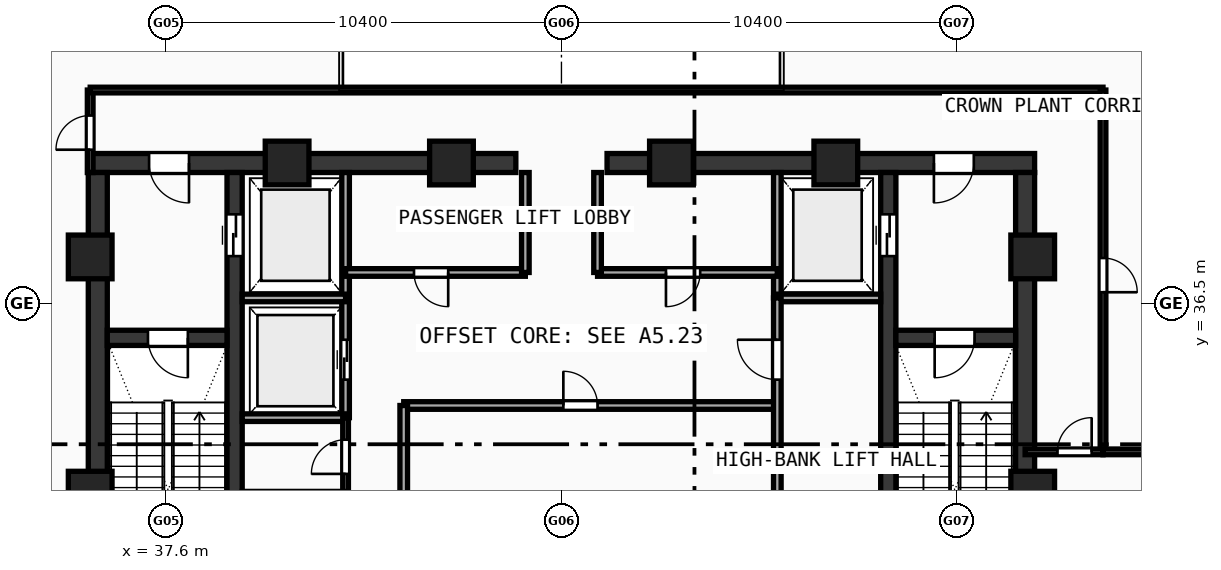
"""IFC4 building model, lengths in metres.
Left out: names, types, materials, properties, quantities, classifications, styles, units other than length and angle.
Written with IfcOpenShell. Run it as: python <this file> out.ifc"""

import sys

from ifc_helpers import new_model, si_unit, direction, frame, frame_2d, origin, origin_with_axes, origin_2d, place, context, subcontext, project, spatial, rectangle, hollow_rectangle, extrude, source, transform, mapped, element, fill, save


model = new_model("IFC4")
c1 = context("Model", 3, precision=1e-05, world=origin(), true_north=direction((0.0, 1.0)))
c2 = subcontext(c1, "Body", "Model", "MODEL_VIEW")
j1 = project(units=[si_unit("LENGTHUNIT", "METRE"), si_unit("PLANEANGLEUNIT", "RADIAN")], contexts=[c1])
p1 = place(None, origin())
s1 = spatial("IfcSite", under=j1, at=p1, CompositionType="ELEMENT")
p2 = place(p1, origin())
s2 = spatial("IfcBuilding", under=s1, at=p2, CompositionType="ELEMENT")
p3 = place(p2, frame((0.0, 0.0, 371.76)))
s3 = spatial("IfcBuildingStorey", under=s2, at=p3, CompositionType="ELEMENT", Elevation=371.76)
p4 = place(p3, frame((35.55, 40.2, 0.0), z_axis=(0.0, 0.0, 1.0), x_axis=(1.0, 0.0, 0.0)))
e1 = element("IfcWall", 1, at=p4, inside=s3, PredefinedType="SHEAR", context=c2, shape_type="SweptSolid", body=[
    extrude(rectangle(XDim=11.25, YDim=0.5, at=frame_2d((5.625, 0.0))), origin(), (0.0, 0.0, 1.0), 4.72),
])
p5 = place(p4, frame((1.6, 0.0, 0.0)))
e2 = element("IfcOpeningElement", 2, at=p5, cuts=e1, PredefinedType="OPENING", context=c2, shape_type="SweptSolid", body=[
    extrude(rectangle(XDim=1.05, YDim=2.1, at=frame_2d((0.525, 1.05))), frame((0.0, 0.26, 0.0), z_axis=(0.0, -1.0, 0.0), x_axis=(1.0, 0.0, 0.0)), (0.0, 0.0, 1.0), 0.52),
])
p6 = place(p3, frame((49.2, 40.2, 0.0), z_axis=(0.0, 0.0, 1.0), x_axis=(1.0, 0.0, 0.0)))
e3 = element("IfcWall", 3, at=p6, inside=s3, PredefinedType="SHEAR", context=c2, shape_type="SweptSolid", body=[
    extrude(rectangle(XDim=11.25, YDim=0.5, at=frame_2d((5.625, 0.0))), origin(), (0.0, 0.0, 1.0), 4.72),
])
p7 = place(p6, frame((8.6, 0.0, 0.0)))
e4 = element("IfcOpeningElement", 4, at=p7, cuts=e3, PredefinedType="OPENING", context=c2, shape_type="SweptSolid", body=[
    extrude(rectangle(XDim=1.05, YDim=2.1, at=frame_2d((0.525, 1.05))), frame((0.0, 0.26, 0.0), z_axis=(0.0, -1.0, 0.0), x_axis=(1.0, 0.0, 0.0)), (0.0, 0.0, 1.0), 0.52),
])
for number, where, z_axis, x_axis in (
    (5, (35.8, 27.75, 0.0), (0.0, 0.0, 1.0), (0.0, 1.0, 0.0)),
    (6, (60.2, 27.75, 0.0), (0.0, 0.0, 1.0), (0.0, 1.0, 0.0)),
):
    element("IfcWall", number, at=place(p3, frame(where, z_axis=z_axis, x_axis=x_axis)), inside=s3, PredefinedType="SHEAR", context=c2, shape_type="SweptSolid", body=[
        extrude(rectangle(XDim=12.2, YDim=0.5, at=frame_2d((6.1, 0.0))), origin(), (0.0, 0.0, 1.0), 4.72),
    ])
p8 = place(p3, frame((39.4, 27.75, 0.0), z_axis=(0.0, 0.0, 1.0), x_axis=(0.0, 1.0, 0.0)))
e7 = element("IfcWall", 7, at=p8, inside=s3, PredefinedType="SHEAR", context=c2, shape_type="SweptSolid", body=[
    extrude(rectangle(XDim=12.2, YDim=0.4, at=frame_2d((6.1, 0.0))), origin(), (0.0, 0.0, 1.0), 4.72),
])
p9 = place(p8, frame((10.0, 0.0, 0.0)))
e8 = element("IfcOpeningElement", 8, at=p9, cuts=e7, PredefinedType="OPENING", context=c2, shape_type="SweptSolid", body=[
    extrude(rectangle(XDim=1.1, YDim=2.1, at=frame_2d((0.55, 1.05))), frame((0.0, 0.21, 0.0), z_axis=(0.0, -1.0, 0.0), x_axis=(1.0, 0.0, 0.0)), (0.0, 0.0, 1.0), 0.42),
])
p10 = place(p3, frame((56.6, 27.75, 0.0), z_axis=(0.0, 0.0, 1.0), x_axis=(0.0, 1.0, 0.0)))
e9 = element("IfcWall", 9, at=p10, inside=s3, PredefinedType="SHEAR", context=c2, shape_type="SweptSolid", body=[
    extrude(rectangle(XDim=12.2, YDim=0.4, at=frame_2d((6.1, 0.0))), origin(), (0.0, 0.0, 1.0), 4.72),
])
p11 = place(p10, frame((10.0, 0.0, 0.0)))
e10 = element("IfcOpeningElement", 10, at=p11, cuts=e9, PredefinedType="OPENING", context=c2, shape_type="SweptSolid", body=[
    extrude(rectangle(XDim=1.1, YDim=2.1, at=frame_2d((0.55, 1.05))), frame((0.0, 0.21, 0.0), z_axis=(0.0, -1.0, 0.0), x_axis=(1.0, 0.0, 0.0)), (0.0, 0.0, 1.0), 0.42),
])
p12 = place(p3, frame((36.05, 35.6, 0.0), z_axis=(0.0, 0.0, 1.0), x_axis=(1.0, 0.0, 0.0)))
e11 = element("IfcWall", 11, at=p12, inside=s3, PredefinedType="SHEAR", context=c2, shape_type="SweptSolid", body=[
    extrude(rectangle(XDim=3.15, YDim=0.4, at=frame_2d((1.575, 0.0))), origin(), (0.0, 0.0, 1.0), 4.72),
])
p13 = place(p12, frame((1.07, 0.0, 0.0)))
e12 = element("IfcOpeningElement", 12, at=p13, cuts=e11, PredefinedType="OPENING", context=c2, shape_type="SweptSolid", body=[
    extrude(rectangle(XDim=1.05, YDim=2.1, at=frame_2d((0.525, 1.05))), frame((0.0, 0.21, 0.0), z_axis=(0.0, -1.0, 0.0), x_axis=(1.0, 0.0, 0.0)), (0.0, 0.0, 1.0), 0.42),
])
p14 = place(p3, frame((56.8, 35.6, 0.0), z_axis=(0.0, 0.0, 1.0), x_axis=(1.0, 0.0, 0.0)))
e13 = element("IfcWall", 13, at=p14, inside=s3, PredefinedType="SHEAR", context=c2, shape_type="SweptSolid", body=[
    extrude(rectangle(XDim=3.15, YDim=0.4, at=frame_2d((1.575, 0.0))), origin(), (0.0, 0.0, 1.0), 4.72),
])
p15 = place(p14, frame((1.02, 0.0, 0.0)))
e14 = element("IfcOpeningElement", 14, at=p15, cuts=e13, PredefinedType="OPENING", context=c2, shape_type="SweptSolid", body=[
    extrude(rectangle(XDim=1.05, YDim=2.1, at=frame_2d((0.525, 1.05))), frame((0.0, 0.21, 0.0), z_axis=(0.0, -1.0, 0.0), x_axis=(1.0, 0.0, 0.0)), (0.0, 0.0, 1.0), 0.42),
])
m1 = source(origin(), c2, "Body", "SweptSolid", [
    extrude(hollow_rectangle(XDim=1.15, YDim=1.15, WallThickness=0.048, at=origin_2d()), origin(), (0.0, 0.0, 1.0), 5.0),
])
for number, where, z_axis, x_axis in (
    (15, (60.4, 31.513, -0.28), (0.0, 0.0, 1.0), (1.0, 0.0, 0.0)),
    (16, (60.4, 37.729, -0.28), (0.0, 0.0, 1.0), (1.0, 0.0, 0.0)),
    (17, (55.219, 40.2, -0.28), (0.0, 0.0, 1.0), (1.0, 0.0, 0.0)),
    (18, (50.894, 40.2, -0.28), (0.0, 0.0, 1.0), (1.0, 0.0, 0.0)),
    (19, (45.106, 40.2, -0.28), (0.0, 0.0, 1.0), (1.0, 0.0, 0.0)),
    (20, (40.781, 40.2, -0.28), (0.0, 0.0, 1.0), (1.0, 0.0, 0.0)),
    (21, (35.6, 37.729, -0.28), (0.0, 0.0, 1.0), (1.0, 0.0, 0.0)),
    (22, (35.6, 31.513, -0.28), (0.0, 0.0, 1.0), (1.0, 0.0, 0.0)),
):
    element("IfcColumn", number, at=place(p3, frame(where, z_axis=z_axis, x_axis=x_axis)), inside=s3, PredefinedType="COLUMN", context=c2, shape_type="MappedRepresentation", body=[
        mapped(m1, transform((0.0, 0.0, 0.0), scale=1.0)),
    ])
p16 = place(p3, frame((42.32, 33.5, 0.0), z_axis=(0.0, 0.0, 1.0), x_axis=(0.0, 1.0, 0.0)))
e23 = element("IfcWall", 23, at=p16, inside=s3, PredefinedType="SOLIDWALL", context=c2, shape_type="SweptSolid", body=[
    extrude(rectangle(XDim=6.45, YDim=0.2, at=frame_2d((3.225, 0.0))), origin(), (0.0, 0.0, 1.0), 4.72),
])
p17 = place(p16, frame((1.0, 0.0, 0.0)))
e24 = element("IfcOpeningElement", 24, at=p17, cuts=e23, PredefinedType="OPENING", context=c2, shape_type="SweptSolid", body=[
    extrude(rectangle(XDim=1.05, YDim=2.1, at=frame_2d((0.525, 1.05))), frame((0.0, 0.11, 0.0), z_axis=(0.0, -1.0, 0.0), x_axis=(1.0, 0.0, 0.0)), (0.0, 0.0, 1.0), 0.22),
])
for number, where, z_axis, x_axis in (
    (25, (39.6, 36.65, 0.0), (0.0, 0.0, 1.0), (1.0, 0.0, 0.0)),
    (26, (39.6, 33.5, 0.0), (0.0, 0.0, 1.0), (1.0, 0.0, 0.0)),
):
    element("IfcWall", number, at=place(p3, frame(where, z_axis=z_axis, x_axis=x_axis)), inside=s3, PredefinedType="SOLIDWALL", context=c2, shape_type="SweptSolid", body=[
        extrude(rectangle(XDim=2.72, YDim=0.2, at=frame_2d((1.36, 0.0))), origin(), (0.0, 0.0, 1.0), 4.72),
    ])
p18 = place(p3, frame((53.68, 36.65, 0.0), z_axis=(0.0, 0.0, 1.0), x_axis=(0.0, 1.0, 0.0)))
e27 = element("IfcWall", 27, at=p18, inside=s3, PredefinedType="SOLIDWALL", context=c2, shape_type="SweptSolid", body=[
    extrude(rectangle(XDim=3.3, YDim=0.2, at=frame_2d((1.65, 0.0))), origin(), (0.0, 0.0, 1.0), 4.72),
])
p19 = place(p3, frame((53.68, 36.65, 0.0), z_axis=(0.0, 0.0, 1.0), x_axis=(1.0, 0.0, 0.0)))
e28 = element("IfcWall", 28, at=p19, inside=s3, PredefinedType="SOLIDWALL", context=c2, shape_type="SweptSolid", body=[
    extrude(rectangle(XDim=2.72, YDim=0.2, at=frame_2d((1.36, 0.0))), origin(), (0.0, 0.0, 1.0), 4.72),
])
p20 = place(p3, frame((42.32, 37.32, 0.0), z_axis=(0.0, 0.0, 1.0), x_axis=(1.0, 0.0, 0.0)))
e29 = element("IfcWall", 29, at=p20, inside=s3, PredefinedType="SOLIDWALL", context=c2, shape_type="SweptSolid", body=[
    extrude(rectangle(XDim=4.73, YDim=0.2, at=frame_2d((2.365, 0.0))), origin(), (0.0, 0.0, 1.0), 4.72),
])
p21 = place(p20, frame((1.8, 0.0, 0.0)))
e30 = element("IfcOpeningElement", 30, at=p21, cuts=e29, PredefinedType="OPENING", context=c2, shape_type="SweptSolid", body=[
    extrude(rectangle(XDim=0.9, YDim=2.1, at=frame_2d((0.45, 1.05))), frame((0.0, 0.11, 0.0), z_axis=(0.0, -1.0, 0.0), x_axis=(1.0, 0.0, 0.0)), (0.0, 0.0, 1.0), 0.22),
])
p22 = place(p3, frame((48.95, 37.32, 0.0), z_axis=(0.0, 0.0, 1.0), x_axis=(1.0, 0.0, 0.0)))
e31 = element("IfcWall", 31, at=p22, inside=s3, PredefinedType="SOLIDWALL", context=c2, shape_type="SweptSolid", body=[
    extrude(rectangle(XDim=4.73, YDim=0.2, at=frame_2d((2.365, 0.0))), origin(), (0.0, 0.0, 1.0), 4.72),
])
p23 = place(p22, frame((1.8, 0.0, 0.0)))
e32 = element("IfcOpeningElement", 32, at=p23, cuts=e31, PredefinedType="OPENING", context=c2, shape_type="SweptSolid", body=[
    extrude(rectangle(XDim=0.9, YDim=2.1, at=frame_2d((0.45, 1.05))), frame((0.0, 0.11, 0.0), z_axis=(0.0, -1.0, 0.0), x_axis=(1.0, 0.0, 0.0)), (0.0, 0.0, 1.0), 0.22),
])
for number, where, z_axis, x_axis in (
    (33, (47.05, 37.32, 0.0), (0.0, 0.0, 1.0), (0.0, 1.0, 0.0)),
    (34, (48.95, 37.32, 0.0), (0.0, 0.0, 1.0), (0.0, 1.0, 0.0)),
):
    element("IfcWall", number, at=place(p3, frame(where, z_axis=z_axis, x_axis=x_axis)), inside=s3, PredefinedType="SOLIDWALL", context=c2, shape_type="SweptSolid", body=[
        extrude(rectangle(XDim=2.63, YDim=0.2, at=frame_2d((1.315, 0.0))), origin(), (0.0, 0.0, 1.0), 4.72),
    ])
p24 = place(p3, frame((43.85, 33.82, 0.0), z_axis=(0.0, 0.0, 1.0), x_axis=(1.0, 0.0, 0.0)))
e35 = element("IfcWall", 35, at=p24, inside=s3, PredefinedType="SOLIDWALL", context=c2, shape_type="SweptSolid", body=[
    extrude(rectangle(XDim=9.83, YDim=0.2, at=frame_2d((4.915, 0.0))), origin(), (0.0, 0.0, 1.0), 4.72),
])
p25 = place(p24, frame((4.2, 0.0, 0.0)))
e36 = element("IfcOpeningElement", 36, at=p25, cuts=e35, PredefinedType="OPENING", context=c2, shape_type="SweptSolid", body=[
    extrude(rectangle(XDim=0.9, YDim=2.1, at=frame_2d((0.45, 1.05))), frame((0.0, 0.11, 0.0), z_axis=(0.0, -1.0, 0.0), x_axis=(1.0, 0.0, 0.0)), (0.0, 0.0, 1.0), 0.22),
])
p26 = place(p3, frame((43.85, 27.6, 0.0), z_axis=(0.0, 0.0, 1.0), x_axis=(0.0, 1.0, 0.0)))
e37 = element("IfcWall", 37, at=p26, inside=s3, PredefinedType="SOLIDWALL", context=c2, shape_type="SweptSolid", body=[
    extrude(rectangle(XDim=6.22, YDim=0.2, at=frame_2d((3.11, 0.0))), origin(), (0.0, 0.0, 1.0), 4.72),
])
p27 = place(p26, frame((2.25, 0.0, 0.0)))
e38 = element("IfcOpeningElement", 38, at=p27, cuts=e37, PredefinedType="OPENING", context=c2, shape_type="SweptSolid", body=[
    extrude(rectangle(XDim=1.05, YDim=2.1, at=frame_2d((0.525, 1.05))), frame((0.0, 0.11, 0.0), z_axis=(0.0, -1.0, 0.0), x_axis=(1.0, 0.0, 0.0)), (0.0, 0.0, 1.0), 0.22),
])
p28 = place(p3, frame((53.68, 27.6, 0.0), z_axis=(0.0, 0.0, 1.0), x_axis=(0.0, 1.0, 0.0)))
e39 = element("IfcWall", 39, at=p28, inside=s3, PredefinedType="SOLIDWALL", context=c2, shape_type="SweptSolid", body=[
    extrude(rectangle(XDim=9.05, YDim=0.2, at=frame_2d((4.525, 0.0))), origin(), (0.0, 0.0, 1.0), 4.72),
])
p29 = place(p28, frame((6.9, 0.0, 0.0)))
e40 = element("IfcOpeningElement", 40, at=p29, cuts=e39, PredefinedType="OPENING", context=c2, shape_type="SweptSolid", body=[
    extrude(rectangle(XDim=1.05, YDim=2.1, at=frame_2d((0.525, 1.05))), frame((0.0, 0.11, 0.0), z_axis=(0.0, -1.0, 0.0), x_axis=(1.0, 0.0, 0.0)), (0.0, 0.0, 1.0), 0.22),
])
p30 = place(p3, frame((42.32, 27.6, 0.0), z_axis=(0.0, 0.0, 1.0), x_axis=(0.0, 1.0, 0.0)))
e41 = element("IfcWall", 41, at=p30, inside=s3, PredefinedType="PARTITIONING", context=c2, shape_type="SweptSolid", body=[
    extrude(rectangle(XDim=5.9, YDim=0.15, at=frame_2d((2.95, 0.0))), origin(), (0.0, 0.0, 1.0), 4.72),
])
p31 = place(p30, frame((0.5, 0.0, 0.0)))
e42 = element("IfcOpeningElement", 42, at=p31, cuts=e41, PredefinedType="OPENING", context=c2, shape_type="SweptSolid", body=[
    extrude(rectangle(XDim=0.9, YDim=2.1, at=frame_2d((0.45, 1.05))), frame((0.0, 0.085, 0.0), z_axis=(0.0, -1.0, 0.0), x_axis=(1.0, 0.0, 0.0)), (0.0, 0.0, 1.0), 0.17),
])
p32 = place(p30, frame((2.45, 0.0, 0.0)))
e43 = element("IfcOpeningElement", 43, at=p32, cuts=e41, PredefinedType="OPENING", context=c2, shape_type="SweptSolid", body=[
    extrude(rectangle(XDim=0.9, YDim=2.1, at=frame_2d((0.45, 1.05))), frame((0.0, 0.085, 0.0), z_axis=(0.0, -1.0, 0.0), x_axis=(1.0, 0.0, 0.0)), (0.0, 0.0, 1.0), 0.17),
])
p33 = place(p30, frame((4.42, 0.0, 0.0)))
e44 = element("IfcOpeningElement", 44, at=p33, cuts=e41, PredefinedType="OPENING", context=c2, shape_type="SweptSolid", body=[
    extrude(rectangle(XDim=0.9, YDim=2.1, at=frame_2d((0.45, 1.05))), frame((0.0, 0.085, 0.0), z_axis=(0.0, -1.0, 0.0), x_axis=(1.0, 0.0, 0.0)), (0.0, 0.0, 1.0), 0.17),
])
p34 = place(p3, frame((35.6, 39.95, 0.0), z_axis=(0.0, 0.0, 1.0), x_axis=(0.0, 1.0, 0.0)))
e45 = element("IfcWall", 45, at=p34, inside=s3, PredefinedType="PARTITIONING", context=c2, shape_type="SweptSolid", body=[
    extrude(rectangle(XDim=2.17, YDim=0.15, at=frame_2d((1.085, 0.0))), origin(), (0.0, 0.0, 1.0), 4.37),
])
p35 = place(p34, frame((0.6, 0.0, 0.0)))
e46 = element("IfcOpeningElement", 46, at=p35, cuts=e45, PredefinedType="OPENING", context=c2, shape_type="SweptSolid", body=[
    extrude(rectangle(XDim=0.9, YDim=2.1, at=frame_2d((0.45, 1.05))), frame((0.0, 0.085, 0.0), z_axis=(0.0, -1.0, 0.0), x_axis=(1.0, 0.0, 0.0)), (0.0, 0.0, 1.0), 0.17),
])
p36 = place(p3, frame((35.6, 42.12, 0.0), z_axis=(0.0, 0.0, 1.0), x_axis=(1.0, 0.0, 0.0)))
e47 = element("IfcWall", 47, at=p36, inside=s3, PredefinedType="PARTITIONING", context=c2, shape_type="SweptSolid", body=[
    extrude(rectangle(XDim=26.65, YDim=0.15, at=frame_2d((13.325, 0.0))), origin(), (0.0, 0.0, 1.0), 4.12),
])
p37 = place(p3, frame((62.25, 32.6, 0.0), z_axis=(0.0, 0.0, 1.0), x_axis=(0.0, 1.0, 0.0)))
e48 = element("IfcWall", 48, at=p37, inside=s3, PredefinedType="PARTITIONING", context=c2, shape_type="SweptSolid", body=[
    extrude(rectangle(XDim=9.52, YDim=0.15, at=frame_2d((4.76, 0.0))), origin(), (0.0, 0.0, 1.0), 4.12),
])
p38 = place(p37, frame((4.2, 0.0, 0.0)))
e49 = element("IfcOpeningElement", 49, at=p38, cuts=e48, PredefinedType="OPENING", context=c2, shape_type="SweptSolid", body=[
    extrude(rectangle(XDim=0.9, YDim=2.1, at=frame_2d((0.45, 1.05))), frame((0.0, 0.085, 0.0), z_axis=(0.0, -1.0, 0.0), x_axis=(1.0, 0.0, 0.0)), (0.0, 0.0, 1.0), 0.17),
])
p39 = place(p3, frame((60.2, 32.6, 0.0), z_axis=(0.0, 0.0, 1.0), x_axis=(1.0, 0.0, 0.0)))
e50 = element("IfcWall", 50, at=p39, inside=s3, PredefinedType="PARTITIONING", context=c2, shape_type="SweptSolid", body=[
    extrude(rectangle(XDim=2.05, YDim=0.15, at=frame_2d((1.025, 0.0))), origin(), (0.0, 0.0, 1.0), 4.72),
])
p40 = place(p39, frame((0.851, 0.0, 0.0)))
e51 = element("IfcOpeningElement", 51, at=p40, cuts=e50, PredefinedType="OPENING", context=c2, shape_type="SweptSolid", body=[
    extrude(rectangle(XDim=0.9, YDim=2.1, at=frame_2d((0.45, 1.05))), frame((0.0, 0.085, 0.0), z_axis=(0.0, -1.0, 0.0), x_axis=(1.0, 0.0, 0.0)), (0.0, 0.0, 1.0), 0.17),
])
p41 = place(p3, frame((62.25, 32.6, 0.0), z_axis=(0.0, 0.0, 1.0), x_axis=(1.0, 0.0, 0.0)))
e52 = element("IfcWall", 52, at=p41, inside=s3, PredefinedType="PARTITIONING", context=c2, shape_type="SweptSolid", body=[
    extrude(rectangle(XDim=9.97, YDim=0.15, at=frame_2d((4.985, 0.0))), origin(), (0.0, 0.0, 1.0), 4.12),
])
m2 = source(origin(), c2, "Body", "SweptSolid", [
    extrude(rectangle(XDim=1.05, YDim=2.1, at=frame_2d((0.525, 1.05))), frame((0.0, 0.025, 0.0), z_axis=(0.0, -1.0, 0.0), x_axis=(1.0, 0.0, 0.0)), (0.0, 0.0, 1.0), 0.05),
])
p42 = place(p13, frame((1.05, 0.0, 0.0), z_axis=(0.0, 0.0, 1.0), x_axis=(-1.0, 0.0, 0.0)))
e53 = element("IfcDoor", 53, at=p42, inside=s3, OperationType="SINGLE_SWING_LEFT", PredefinedType="DOOR", context=c2, shape_type="MappedRepresentation", body=[
    mapped(m2, transform((0.0, 0.0, 0.0), scale=1.0)),
])
fill(e12, e53)
p43 = place(p15, frame((1.05, 0.0, 0.0), z_axis=(0.0, 0.0, 1.0), x_axis=(-1.0, 0.0, 0.0)))
e54 = element("IfcDoor", 54, at=p43, inside=s3, OperationType="SINGLE_SWING_RIGHT", PredefinedType="DOOR", context=c2, shape_type="MappedRepresentation", body=[
    mapped(m2, transform((0.0, 0.0, 0.0), scale=1.0)),
])
fill(e14, e54)
p44 = place(p5, frame((1.05, 0.0, 0.0), z_axis=(0.0, 0.0, 1.0), x_axis=(-1.0, 0.0, 0.0)))
e55 = element("IfcDoor", 55, at=p44, inside=s3, OperationType="SINGLE_SWING_LEFT", PredefinedType="DOOR", context=c2, shape_type="MappedRepresentation", body=[
    mapped(m2, transform((0.0, 0.0, 0.0), scale=1.0)),
])
fill(e2, e55)
p45 = place(p7, frame((1.05, 0.0, 0.0), z_axis=(0.0, 0.0, 1.0), x_axis=(-1.0, 0.0, 0.0)))
e56 = element("IfcDoor", 56, at=p45, inside=s3, OperationType="SINGLE_SWING_RIGHT", PredefinedType="DOOR", context=c2, shape_type="MappedRepresentation", body=[
    mapped(m2, transform((0.0, 0.0, 0.0), scale=1.0)),
])
fill(e4, e56)
m3 = source(origin(), c2, "Body", "SweptSolid", [
    extrude(rectangle(XDim=1.1, YDim=2.1, at=frame_2d((0.55, 1.05))), frame((0.0, 0.025, 0.0), z_axis=(0.0, -1.0, 0.0), x_axis=(1.0, 0.0, 0.0)), (0.0, 0.0, 1.0), 0.05),
])
p46 = place(p9, frame((1.1, 0.0, 0.0), z_axis=(0.0, 0.0, 1.0), x_axis=(-1.0, 0.0, 0.0)))
e57 = element("IfcDoor", 57, at=p46, inside=s3, OperationType="DOUBLE_DOOR_SLIDING", PredefinedType="DOOR", context=c2, shape_type="MappedRepresentation", body=[
    mapped(m3, transform((0.0, 0.0, 0.0), scale=1.0)),
])
fill(e8, e57)
p47 = place(p11, origin_with_axes())
e58 = element("IfcDoor", 58, at=p47, inside=s3, OperationType="DOUBLE_DOOR_SLIDING", PredefinedType="DOOR", context=c2, shape_type="MappedRepresentation", body=[
    mapped(m3, transform((0.0, 0.0, 0.0), scale=1.0)),
])
fill(e10, e58)
p48 = place(p17, origin_with_axes())
e59 = element("IfcDoor", 59, at=p48, inside=s3, OperationType="DOUBLE_DOOR_SLIDING", PredefinedType="DOOR", context=c2, shape_type="MappedRepresentation", body=[
    mapped(m2, transform((0.0, 0.0, 0.0), scale=1.0)),
])
fill(e24, e59)
m4 = source(origin(), c2, "Body", "SweptSolid", [
    extrude(rectangle(XDim=0.9, YDim=2.1, at=frame_2d((0.45, 1.05))), frame((0.0, 0.025, 0.0), z_axis=(0.0, -1.0, 0.0), x_axis=(1.0, 0.0, 0.0)), (0.0, 0.0, 1.0), 0.05),
])
p49 = place(p21, frame((0.9, 0.0, 0.0), z_axis=(0.0, 0.0, 1.0), x_axis=(-1.0, 0.0, 0.0)))
e60 = element("IfcDoor", 60, at=p49, inside=s3, OperationType="SINGLE_SWING_LEFT", PredefinedType="DOOR", context=c2, shape_type="MappedRepresentation", body=[
    mapped(m4, transform((0.0, 0.0, 0.0), scale=1.0)),
])
fill(e30, e60)
p50 = place(p23, frame((0.9, 0.0, 0.0), z_axis=(0.0, 0.0, 1.0), x_axis=(-1.0, 0.0, 0.0)))
e61 = element("IfcDoor", 61, at=p50, inside=s3, OperationType="SINGLE_SWING_RIGHT", PredefinedType="DOOR", context=c2, shape_type="MappedRepresentation", body=[
    mapped(m4, transform((0.0, 0.0, 0.0), scale=1.0)),
])
fill(e32, e61)
p51 = place(p25, origin_with_axes())
e62 = element("IfcDoor", 62, at=p51, inside=s3, OperationType="SINGLE_SWING_LEFT", PredefinedType="DOOR", context=c2, shape_type="MappedRepresentation", body=[
    mapped(m4, transform((0.0, 0.0, 0.0), scale=1.0)),
])
fill(e36, e62)
p52 = place(p29, origin_with_axes())
e63 = element("IfcDoor", 63, at=p52, inside=s3, OperationType="SINGLE_SWING_RIGHT", PredefinedType="DOOR", context=c2, shape_type="MappedRepresentation", body=[
    mapped(m2, transform((0.0, 0.0, 0.0), scale=1.0)),
])
fill(e40, e63)
p53 = place(p33, origin_with_axes())
e64 = element("IfcDoor", 64, at=p53, inside=s3, OperationType="SINGLE_SWING_LEFT", PredefinedType="DOOR", context=c2, shape_type="MappedRepresentation", body=[
    mapped(m4, transform((0.0, 0.0, 0.0), scale=1.0)),
])
fill(e44, e64)
p54 = place(p35, origin_with_axes())
e65 = element("IfcDoor", 65, at=p54, inside=s3, OperationType="SINGLE_SWING_LEFT", PredefinedType="DOOR", context=c2, shape_type="MappedRepresentation", body=[
    mapped(m4, transform((0.0, 0.0, 0.0), scale=1.0)),
])
fill(e46, e65)
p55 = place(p38, frame((0.9, 0.0, 0.0), z_axis=(0.0, 0.0, 1.0), x_axis=(-1.0, 0.0, 0.0)))
e66 = element("IfcDoor", 66, at=p55, inside=s3, OperationType="SINGLE_SWING_RIGHT", PredefinedType="DOOR", context=c2, shape_type="MappedRepresentation", body=[
    mapped(m4, transform((0.0, 0.0, 0.0), scale=1.0)),
])
fill(e49, e66)
p56 = place(p40, origin_with_axes())
e67 = element("IfcDoor", 67, at=p56, inside=s3, OperationType="SINGLE_SWING_RIGHT", PredefinedType="DOOR", context=c2, shape_type="MappedRepresentation", body=[
    mapped(m4, transform((0.0, 0.0, 0.0), scale=1.0)),
])
fill(e51, e67)
save(model, sys.argv[1])
